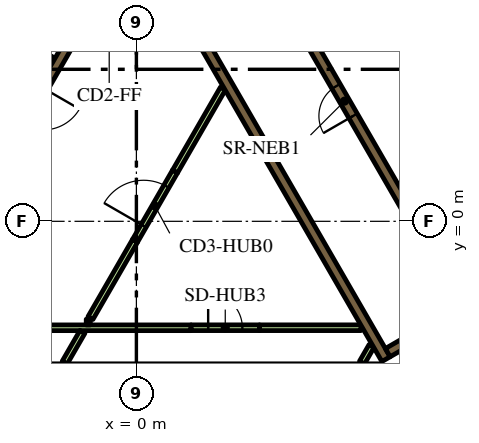
"""IFC4 building model, lengths in metres.
Left out: names, types, materials, properties, quantities, classifications, styles, units other than length and angle.
Written with IfcOpenShell. Run it as: python <this file> out.ifc"""

import sys

from ifc_helpers import new_model, si_unit, direction, frame, frame_2d, origin, place, context, subcontext, project, spatial, polyline, rectangle, outline, extrude, element, fill, save


model = new_model("IFC4")
c1 = context("Model", 3, precision=1e-05, world=origin(), true_north=direction((0.0, 1.0)))
c2 = subcontext(c1, "Body", "Model", "MODEL_VIEW")
j1 = project(units=[si_unit("LENGTHUNIT", "METRE"), si_unit("PLANEANGLEUNIT", "RADIAN")], contexts=[c1])
p1 = place(None, origin())
s1 = spatial("IfcSite", under=j1, at=p1, CompositionType="ELEMENT")
p2 = place(p1, origin())
s2 = spatial("IfcBuilding", under=s1, at=p2, CompositionType="ELEMENT")
p3 = place(p2, frame((0.0, 0.0, 54.9)))
s3 = spatial("IfcBuildingStorey", under=s2, at=p3, CompositionType="ELEMENT", Elevation=54.9)
p4 = place(p3, frame((6.776, 13.364, 0.0), z_axis=(0.0, 0.0, 1.0), x_axis=(0.500004177138, -0.8660229921, 0.0)))
e1 = element("IfcWall", 1, at=p4, inside=s3, PredefinedType="SOLIDWALL", context=c2, shape_type="SweptSolid", body=[
    extrude(rectangle(XDim=20.204, YDim=0.9, at=frame_2d((10.102, 0.0))), origin(), (0.0, 0.0, 1.0), 3.9),
])
p5 = place(p3, origin())
e2 = element("IfcWall", 2, at=p5, inside=s3, PredefinedType="SOLIDWALL", context=c2, shape_type="SweptSolid", body=[
    extrude(outline(polyline([(0.335, 6.925), (0.335, 6.925), (0.335, 7.075), (0.335, 7.075), (0.335, 7.075), (0.245, 7.075), (0.079, 7.363), (0.035, 7.439), (0.252, 7.564), (0.377, 7.348), (6.552, -3.348), (6.677, -3.564), (6.46, -3.689), (4.897, -0.981), (0.332, 6.925), (0.335, 6.925), (0.335, 6.925)])), origin(), (0.0, 0.0, 1.0), 3.9),
])
p6 = place(p3, frame((9.352, -1.875, 0.0), z_axis=(0.0, 0.0, 1.0), x_axis=(-0.866024844342, -0.500000968981, 0.0)))
e3 = element("IfcWall", 3, at=p6, inside=s3, PredefinedType="SOLIDWALL", context=c2, shape_type="SweptSolid", body=[
    extrude(rectangle(XDim=3.162, YDim=0.25, at=frame_2d((1.581, 0.0))), origin(), (0.0, 0.0, 1.0), 3.9),
])
p7 = place(p3, frame((-2.204, 4.182, 0.0), z_axis=(0.0, 0.0, 1.0), x_axis=(-0.866008176907, 0.50002983664, 0.0)))
e4 = element("IfcWall", 4, at=p7, inside=s3, PredefinedType="SOLIDWALL", context=c2, shape_type="SweptSolid", body=[
    extrude(rectangle(XDim=2.2, YDim=0.25, at=frame_2d((1.1, 0.0))), origin(), (0.0, 0.0, 1.0), 3.9),
])
p8 = place(p3, frame((-6.086, -2.801, 0.0), z_axis=(0.0, 0.0, 1.0), x_axis=(1.0, 0.0, 0.0)))
e5 = element("IfcWall", 5, at=p8, inside=s3, PredefinedType="PARTITIONING", context=c2, shape_type="SweptSolid", body=[
    extrude(rectangle(XDim=7.524, YDim=0.15, at=frame_2d((3.762, 0.0))), origin(), (0.0, 0.0, 1.0), 2.75),
])
p9 = place(p3, frame((-1.887, -3.718, 0.0), z_axis=(0.0, 0.0, 1.0), x_axis=(0.499842898591, 0.866116087328, 0.0)))
e6 = element("IfcWall", 6, at=p9, inside=s3, PredefinedType="PARTITIONING", context=c2, shape_type="SweptSolid", body=[
    extrude(rectangle(XDim=0.936, YDim=0.15, at=frame_2d((0.468, 0.0))), origin(), (0.0, 0.0, 1.0), 2.75),
])
p10 = place(p3, frame((-1.212, -2.651, 0.0), z_axis=(0.0, 0.0, 1.0), x_axis=(-1.0, 0.0, 0.0)))
e7 = element("IfcWall", 7, at=p10, inside=s3, PredefinedType="PARTITIONING", context=c2, shape_type="SweptSolid", body=[
    extrude(rectangle(XDim=0.108, YDim=0.15, at=frame_2d((0.054, 0.0))), origin(), (0.0, 0.0, 1.0), 2.75),
])
p11 = place(p3, frame((-1.208, -2.544, 0.0), z_axis=(0.0, 0.0, 1.0), x_axis=(0.499995339376, 0.86602809458, 0.0)))
e8 = element("IfcWall", 8, at=p11, inside=s3, PredefinedType="PARTITIONING", context=c2, shape_type="SweptSolid", body=[
    extrude(rectangle(XDim=2.349, YDim=0.15, at=frame_2d((1.175, 0.0))), origin(), (0.0, 0.0, 1.0), 2.75),
])
p12 = place(p3, frame((5.936, -3.718, 0.0), z_axis=(0.0, 0.0, 1.0), x_axis=(0.499890179513, 0.866088799389, 0.0)))
e9 = element("IfcWall", 9, at=p12, inside=s3, PredefinedType="PARTITIONING", context=c2, shape_type="SweptSolid", body=[
    extrude(rectangle(XDim=0.504, YDim=0.15, at=frame_2d((0.252, 0.0))), origin(), (0.0, 0.0, 1.0), 2.75),
])
p13 = place(p3, frame((3.238, -2.8, 0.0), z_axis=(0.0, 0.0, 1.0), x_axis=(1.0, 0.0, 0.0)))
e10 = element("IfcWall", 10, at=p13, inside=s3, PredefinedType="PARTITIONING", context=c2, shape_type="SweptSolid", body=[
    extrude(rectangle(XDim=2.672, YDim=0.15, at=frame_2d((1.336, 0.0))), origin(), (0.0, 0.0, 1.0), 2.75),
])
p14 = place(p3, frame((1.016, 1.309, 0.0), z_axis=(0.0, 0.0, 1.0), x_axis=(0.49998231768, 0.866035612436, 0.0)))
e11 = element("IfcWall", 11, at=p14, inside=s3, PredefinedType="PARTITIONING", context=c2, shape_type="SweptSolid", body=[
    extrude(rectangle(XDim=2.521, YDim=0.15, at=frame_2d((1.26, 0.0))), origin(), (0.0, 0.0, 1.0), 2.75),
])
p15 = place(p3, frame((11.553, -0.46, 0.0), z_axis=(0.0, 0.0, 1.0), x_axis=(-0.500006514828, 0.866021642414, 0.0)))
e12 = element("IfcWall", 12, at=p15, inside=s3, PredefinedType="SOLIDWALL", context=c2, shape_type="SweptSolid", body=[
    extrude(rectangle(XDim=12.35, YDim=0.25, at=frame_2d((6.175, 0.0))), origin(), (0.0, 0.0, 1.0), 3.9),
])
p16 = place(p15, frame((0.585, 0.0, 0.0)))
e13 = element("IfcOpeningElement", 13, at=p16, cuts=e12, PredefinedType="OPENING", context=c2, shape_type="SweptSolid", body=[
    extrude(rectangle(XDim=1.1, YDim=2.1, at=frame_2d((0.55, 1.05))), frame((0.0, 0.135, 0.0), z_axis=(0.0, -1.0, 0.0), x_axis=(1.0, 0.0, 0.0)), (0.0, 0.0, 1.0), 0.27),
])
p17 = place(p15, frame((3.105, 0.0, 0.0)))
e14 = element("IfcOpeningElement", 14, at=p17, cuts=e12, PredefinedType="OPENING", context=c2, shape_type="SweptSolid", body=[
    extrude(rectangle(XDim=1.1, YDim=2.1, at=frame_2d((0.55, 1.05))), frame((0.0, 0.135, 0.0), z_axis=(0.0, -1.0, 0.0), x_axis=(1.0, 0.0, 0.0)), (0.0, 0.0, 1.0), 0.27),
])
p18 = place(p15, frame((5.625, 0.0, 0.0)))
e15 = element("IfcOpeningElement", 15, at=p18, cuts=e12, PredefinedType="OPENING", context=c2, shape_type="SweptSolid", body=[
    extrude(rectangle(XDim=1.1, YDim=2.1, at=frame_2d((0.55, 1.05))), frame((0.0, 0.135, 0.0), z_axis=(0.0, -1.0, 0.0), x_axis=(1.0, 0.0, 0.0)), (0.0, 0.0, 1.0), 0.27),
])
p19 = place(p3, frame((8.565, -2.185, 0.0), z_axis=(0.0, 0.0, 1.0), x_axis=(-0.499997954832, 0.866026584559, 0.0)))
e16 = element("IfcWall", 16, at=p19, inside=s3, PredefinedType="SOLIDWALL", context=c2, shape_type="SweptSolid", body=[
    extrude(rectangle(XDim=12.35, YDim=0.25, at=frame_2d((6.175, 0.0))), origin(), (0.0, 0.0, 1.0), 3.9),
])
p20 = place(p19, frame((5.725, 0.0, 0.0)))
e17 = element("IfcOpeningElement", 17, at=p20, cuts=e16, PredefinedType="OPENING", context=c2, shape_type="SweptSolid", body=[
    extrude(rectangle(XDim=0.9, YDim=2.1, at=frame_2d((0.45, 1.05))), frame((0.0, 0.135, 0.0), z_axis=(0.0, -1.0, 0.0), x_axis=(1.0, 0.0, 0.0)), (0.0, 0.0, 1.0), 0.27),
])
p21 = place(p3, frame((-0.898, 6.194, 0.0), z_axis=(0.0, 0.0, 1.0), x_axis=(-0.499996202215, -0.866027596426, 0.0)))
e18 = element("IfcWall", 18, at=p21, inside=s3, PredefinedType="SOLIDWALL", context=c2, shape_type="SweptSolid", body=[
    extrude(rectangle(XDim=9.83, YDim=0.25, at=frame_2d((4.915, 0.0))), origin(), (0.0, 0.0, 1.0), 3.9),
])
p22 = place(p21, frame((0.585, 0.0, 0.0)))
e19 = element("IfcOpeningElement", 19, at=p22, cuts=e18, PredefinedType="OPENING", context=c2, shape_type="SweptSolid", body=[
    extrude(rectangle(XDim=1.1, YDim=2.1, at=frame_2d((0.55, 1.05))), frame((0.0, 0.135, 0.0), z_axis=(0.0, -1.0, 0.0), x_axis=(1.0, 0.0, 0.0)), (0.0, 0.0, 1.0), 0.27),
])
p23 = place(p21, frame((3.105, 0.0, 0.0)))
e20 = element("IfcOpeningElement", 20, at=p23, cuts=e18, PredefinedType="OPENING", context=c2, shape_type="SweptSolid", body=[
    extrude(rectangle(XDim=1.1, YDim=2.1, at=frame_2d((0.55, 1.05))), frame((0.0, 0.135, 0.0), z_axis=(0.0, -1.0, 0.0), x_axis=(1.0, 0.0, 0.0)), (0.0, 0.0, 1.0), 0.27),
])
p24 = place(p21, frame((5.625, 0.0, 0.0)))
e21 = element("IfcOpeningElement", 21, at=p24, cuts=e18, PredefinedType="OPENING", context=c2, shape_type="SweptSolid", body=[
    extrude(rectangle(XDim=1.1, YDim=2.1, at=frame_2d((0.55, 1.05))), frame((0.0, 0.135, 0.0), z_axis=(0.0, -1.0, 0.0), x_axis=(1.0, 0.0, 0.0)), (0.0, 0.0, 1.0), 0.27),
])
p25 = place(p21, frame((8.145, 0.0, 0.0)))
e22 = element("IfcOpeningElement", 22, at=p25, cuts=e18, PredefinedType="OPENING", context=c2, shape_type="SweptSolid", body=[
    extrude(rectangle(XDim=1.1, YDim=2.1, at=frame_2d((0.55, 1.05))), frame((0.0, 0.135, 0.0), z_axis=(0.0, -1.0, 0.0), x_axis=(1.0, 0.0, 0.0)), (0.0, 0.0, 1.0), 0.27),
])
p26 = place(p3, frame((7.048, -5.292, 0.0), z_axis=(0.0, 0.0, 1.0), x_axis=(0.49994051562, 0.866059744384, 0.0)))
e23 = element("IfcWall", 23, at=p26, inside=s3, PredefinedType="SOLIDWALL", context=c2, shape_type="SweptSolid", body=[
    extrude(rectangle(XDim=2.1, YDim=0.4, at=frame_2d((1.05, 0.0))), origin(), (0.0, 0.0, 1.0), 3.9),
])
p27 = place(p26, frame((0.45, 0.0, 0.0)))
e24 = element("IfcOpeningElement", 24, at=p27, cuts=e23, PredefinedType="OPENING", context=c2, shape_type="SweptSolid", body=[
    extrude(rectangle(XDim=1.2, YDim=2.1, at=frame_2d((0.6, 1.05))), frame((0.0, 0.21, 0.0), z_axis=(0.0, -1.0, 0.0), x_axis=(1.0, 0.0, 0.0)), (0.0, 0.0, 1.0), 0.42),
])
p28 = place(p3, frame((-0.034, -0.509, 0.0), z_axis=(0.0, 0.0, 1.0), x_axis=(0.49994051562, 0.866059744384, 0.0)))
e25 = element("IfcWall", 25, at=p28, inside=s3, PredefinedType="PARTITIONING", context=c2, shape_type="SweptSolid", body=[
    extrude(rectangle(XDim=2.1, YDim=0.15, at=frame_2d((1.05, 0.0))), origin(), (0.0, 0.0, 1.0), 2.75),
])
p29 = place(p28, frame((0.45, 0.0, 0.0)))
e26 = element("IfcOpeningElement", 26, at=p29, cuts=e25, PredefinedType="OPENING", context=c2, shape_type="SweptSolid", body=[
    extrude(rectangle(XDim=1.2, YDim=2.1, at=frame_2d((0.6, 1.05))), frame((0.0, 0.085, 0.0), z_axis=(0.0, -1.0, 0.0), x_axis=(1.0, 0.0, 0.0)), (0.0, 0.0, 1.0), 0.17),
])
p30 = place(p3, frame((1.438, -2.8, 0.0), z_axis=(0.0, 0.0, 1.0), x_axis=(1.0, 0.0, 0.0)))
e27 = element("IfcWall", 27, at=p30, inside=s3, PredefinedType="PARTITIONING", context=c2, shape_type="SweptSolid", body=[
    extrude(rectangle(XDim=1.8, YDim=0.15, at=frame_2d((0.9, 0.0))), origin(), (0.0, 0.0, 1.0), 2.75),
])
p31 = place(p30, frame((0.45, 0.0, 0.0)))
e28 = element("IfcOpeningElement", 28, at=p31, cuts=e27, PredefinedType="OPENING", context=c2, shape_type="SweptSolid", body=[
    extrude(rectangle(XDim=0.9, YDim=2.1, at=frame_2d((0.45, 1.05))), frame((0.0, 0.085, 0.0), z_axis=(0.0, -1.0, 0.0), x_axis=(1.0, 0.0, 0.0)), (0.0, 0.0, 1.0), 0.17),
])
p32 = place(p3, frame((6.163, 18.475, 0.0), z_axis=(0.0, 0.0, 1.0), x_axis=(0.500001317485, -0.866024643133, 0.0)))
e29 = element("IfcWall", 29, at=p32, inside=s3, PredefinedType="PARTITIONING", context=c2, shape_type="SweptSolid", body=[
    extrude(rectangle(XDim=25.767, YDim=0.15, at=frame_2d((12.883, 0.0))), origin(), (0.0, 0.0, 1.0), 2.75),
])
p33 = place(p32, frame((24.586, 0.0, 0.0)))
e30 = element("IfcOpeningElement", 30, at=p33, cuts=e29, PredefinedType="OPENING", context=c2, shape_type="SweptSolid", body=[
    extrude(rectangle(XDim=1.0, YDim=2.1, at=frame_2d((0.5, 1.05))), frame((0.0, 0.085, 0.0), z_axis=(0.0, -1.0, 0.0), x_axis=(1.0, 0.0, 0.0)), (0.0, 0.0, 1.0), 0.17),
])
p34 = place(p32, frame((13.144, 0.0, 0.0)))
e31 = element("IfcOpeningElement", 31, at=p34, cuts=e29, PredefinedType="OPENING", context=c2, shape_type="SweptSolid", body=[
    extrude(rectangle(XDim=1.0, YDim=2.1, at=frame_2d((0.5, 1.05))), frame((0.0, 0.085, 0.0), z_axis=(0.0, -1.0, 0.0), x_axis=(1.0, 0.0, 0.0)), (0.0, 0.0, 1.0), 0.17),
])
p35 = place(p32, frame((11.692, 0.0, 0.0)))
e32 = element("IfcOpeningElement", 32, at=p35, cuts=e29, PredefinedType="OPENING", context=c2, shape_type="SweptSolid", body=[
    extrude(rectangle(XDim=1.0, YDim=2.1, at=frame_2d((0.5, 1.05))), frame((0.0, 0.085, 0.0), z_axis=(0.0, -1.0, 0.0), x_axis=(1.0, 0.0, 0.0)), (0.0, 0.0, 1.0), 0.17),
])
p36 = place(p32, frame((0.572, 0.0, 0.0)))
e33 = element("IfcOpeningElement", 33, at=p36, cuts=e29, PredefinedType="OPENING", context=c2, shape_type="SweptSolid", body=[
    extrude(rectangle(XDim=1.0, YDim=2.1, at=frame_2d((0.5, 1.05))), frame((0.0, 0.085, 0.0), z_axis=(0.0, -1.0, 0.0), x_axis=(1.0, 0.0, 0.0)), (0.0, 0.0, 1.0), 0.17),
])
p37 = place(p20, origin())
e34 = element("IfcDoor", 34, at=p37, inside=s3, OperationType="SINGLE_SWING_LEFT", PredefinedType="DOOR", context=c2, shape_type="SweptSolid", body=[
    extrude(rectangle(XDim=0.9, YDim=2.1, at=frame_2d((0.45, 1.05))), frame((0.0, 0.025, 0.0), z_axis=(0.0, -1.0, 0.0), x_axis=(1.0, 0.0, 0.0)), (0.0, 0.0, 1.0), 0.05),
])
fill(e17, e34)
p38 = place(p29, origin())
e35 = element("IfcDoor", 35, at=p38, inside=s3, OperationType="SINGLE_SWING_LEFT", PredefinedType="DOOR", context=c2, shape_type="SweptSolid", body=[
    extrude(rectangle(XDim=1.2, YDim=2.1, at=frame_2d((0.6, 1.05))), frame((0.0, 0.025, 0.0), z_axis=(0.0, -1.0, 0.0), x_axis=(1.0, 0.0, 0.0)), (0.0, 0.0, 1.0), 0.05),
])
fill(e26, e35)
p39 = place(p31, origin())
e36 = element("IfcDoor", 36, at=p39, inside=s3, OperationType="SINGLE_SWING_LEFT", PredefinedType="DOOR", context=c2, shape_type="SweptSolid", body=[
    extrude(rectangle(XDim=0.9, YDim=2.1, at=frame_2d((0.45, 1.05))), frame((0.0, 0.025, 0.0), z_axis=(0.0, -1.0, 0.0), x_axis=(1.0, 0.0, 0.0)), (0.0, 0.0, 1.0), 0.05),
])
fill(e28, e36)
save(model, sys.argv[1])
